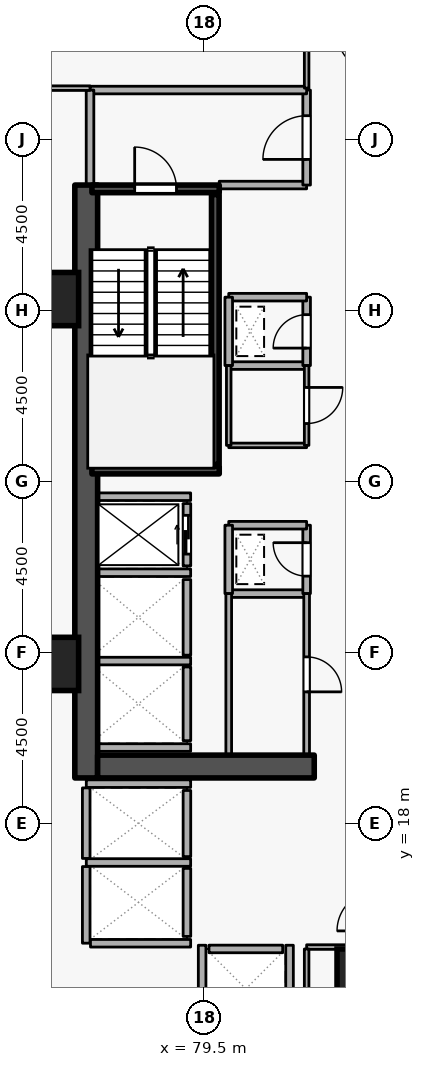
"""IFC4 building model, lengths in metres.
Left out: names, types, materials, properties, quantities, classifications, styles, units other than length and angle.
Written with IfcOpenShell. Run it as: python <this file> out.ifc"""

import sys

from ifc_helpers import new_model, si_unit, direction, frame, frame_2d, origin, origin_2d, place, context, subcontext, project, spatial, rectangle, extrude, element, fill, save


model = new_model("IFC4")
c1 = context("Model", 3, precision=1e-05, world=origin(), true_north=direction((0.0, 1.0)))
c2 = subcontext(c1, "Body", "Model", "MODEL_VIEW")
j1 = project(units=[si_unit("LENGTHUNIT", "METRE"), si_unit("PLANEANGLEUNIT", "RADIAN")], contexts=[c1])
p1 = place(None, origin())
s1 = spatial("IfcSite", under=j1, at=p1, CompositionType="ELEMENT")
p2 = place(p1, origin())
s2 = spatial("IfcBuilding", under=s1, at=p2, CompositionType="ELEMENT")
p3 = place(p2, frame((0.0, 0.0, 45.9)))
s3 = spatial("IfcBuildingStorey", under=s2, at=p3, CompositionType="ELEMENT", Elevation=45.9)
p4 = place(p3, frame((76.4, 19.2, 0.0), z_axis=(0.0, 0.0, 1.0), x_axis=(0.0, 1.0, 0.0)))
e1 = element("IfcWall", 1, at=p4, inside=s3, PredefinedType="SHEAR", context=c2, shape_type="SweptSolid", body=[
    extrude(rectangle(XDim=15.6, YDim=0.6, at=frame_2d((7.8, 0.0))), origin(), (0.0, 0.0, 1.0), 3.6),
])
p5 = place(p3, frame((76.7, 19.5, 0.0), z_axis=(0.0, 0.0, 1.0), x_axis=(1.0, 0.0, 0.0)))
e2 = element("IfcWall", 2, at=p5, inside=s3, PredefinedType="SHEAR", context=c2, shape_type="SweptSolid", body=[
    extrude(rectangle(XDim=5.7, YDim=0.6, at=frame_2d((2.85, 0.0))), origin(), (0.0, 0.0, 1.0), 3.6),
])
for number, where, z_axis, x_axis in (
    (3, (83.7, 14.0, 0.0), (0.0, 0.0, 1.0), (1.0, 0.0, 0.0)),
    (4, (75.5, 22.2, 0.0), (0.0, 0.0, 1.0), (1.0, 0.0, 0.0)),
    (5, (75.5, 31.8, 0.0), (0.0, 0.0, 1.0), (1.0, 0.0, 0.0)),
):
    element("IfcColumn", number, at=place(p3, frame(where, z_axis=z_axis, x_axis=x_axis)), inside=s3, PredefinedType="COLUMN", context=c2, shape_type="SweptSolid", body=[
        extrude(rectangle(XDim=1.4, YDim=1.4, at=origin_2d()), origin(), (0.0, 0.0, 1.0), 3.6),
    ])
p6 = place(p3, frame((79.05, 24.78, 0.0), z_axis=(0.0, 0.0, 1.0), x_axis=(0.0, 1.0, 0.0)))
e6 = element("IfcWall", 6, at=p6, inside=s3, PredefinedType="STANDARD", context=c2, shape_type="SweptSolid", body=[
    extrude(rectangle(XDim=1.64, YDim=0.2, at=frame_2d((0.82, 0.0))), origin(), (0.0, 0.0, 1.0), 3.26),
])
p7 = place(p6, frame((0.31, 0.0, 0.0)))
e7 = element("IfcOpeningElement", 7, at=p7, cuts=e6, PredefinedType="OPENING", context=c2, shape_type="SweptSolid", body=[
    extrude(rectangle(XDim=1.02, YDim=2.06, at=frame_2d((0.51, 1.03))), frame((0.0, 0.11, 0.0), z_axis=(0.0, -1.0, 0.0), x_axis=(1.0, 0.0, 0.0)), (0.0, 0.0, 1.0), 0.22),
])
p8 = place(p3, frame((79.05, 22.43, 0.0), z_axis=(0.0, 0.0, 1.0), x_axis=(0.0, 1.0, 0.0)))
e8 = element("IfcWall", 8, at=p8, inside=s3, PredefinedType="STANDARD", context=c2, shape_type="SweptSolid", body=[
    extrude(rectangle(XDim=1.99, YDim=0.2, at=frame_2d((0.995, 0.0))), origin(), (0.0, 0.0, 1.0), 3.26),
])
p9 = place(p3, frame((79.05, 20.18, 0.0), z_axis=(0.0, 0.0, 1.0), x_axis=(0.0, 1.0, 0.0)))
e9 = element("IfcWall", 9, at=p9, inside=s3, PredefinedType="STANDARD", context=c2, shape_type="SweptSolid", body=[
    extrude(rectangle(XDim=1.94, YDim=0.2, at=frame_2d((0.97, 0.0))), origin(), (0.0, 0.0, 1.0), 3.26),
])
p10 = place(p3, frame((79.05, 17.13, 0.0), z_axis=(0.0, 0.0, 1.0), x_axis=(0.0, 1.0, 0.0)))
e10 = element("IfcWall", 10, at=p10, inside=s3, PredefinedType="STANDARD", context=c2, shape_type="SweptSolid", body=[
    extrude(rectangle(XDim=1.74, YDim=0.2, at=frame_2d((0.87, 0.0))), origin(), (0.0, 0.0, 1.0), 3.26),
])
p11 = place(p3, frame((79.05, 15.03, 0.0), z_axis=(0.0, 0.0, 1.0), x_axis=(0.0, 1.0, 0.0)))
e11 = element("IfcWall", 11, at=p11, inside=s3, PredefinedType="STANDARD", context=c2, shape_type="SweptSolid", body=[
    extrude(rectangle(XDim=1.79, YDim=0.2, at=frame_2d((0.895, 0.0))), origin(), (0.0, 0.0, 1.0), 3.26),
])
p12 = place(p3, frame((79.63, 14.7, 0.0), z_axis=(0.0, 0.0, 1.0), x_axis=(1.0, 0.0, 0.0)))
e12 = element("IfcWall", 12, at=p12, inside=s3, PredefinedType="STANDARD", context=c2, shape_type="SweptSolid", body=[
    extrude(rectangle(XDim=1.94, YDim=0.2, at=frame_2d((0.97, 0.0))), origin(), (0.0, 0.0, 1.0), 3.26),
])
for number, where, z_axis, x_axis in (
    (13, (76.712, 26.6, 0.0), (0.0, 0.0, 1.0), (1.0, 0.0, 0.0)),
    (14, (76.712, 24.6, 0.0), (0.0, 0.0, 1.0), (1.0, 0.0, 0.0)),
    (15, (76.712, 22.275, 0.0), (0.0, 0.0, 1.0), (1.0, 0.0, 0.0)),
    (16, (76.712, 20.0, 0.0), (0.0, 0.0, 1.0), (1.0, 0.0, 0.0)),
):
    element("IfcWall", number, at=place(p3, frame(where, z_axis=z_axis, x_axis=x_axis)), inside=s3, PredefinedType="STANDARD", context=c2, shape_type="SweptSolid", body=[
        extrude(rectangle(XDim=2.436, YDim=0.2, at=frame_2d((1.218, 0.0))), origin(), (0.0, 0.0, 1.0), 3.26),
    ])
p13 = place(p3, frame((76.402, 19.05, 0.0), z_axis=(0.0, 0.0, 1.0), x_axis=(1.0, 0.0, 0.0)))
e17 = element("IfcWall", 17, at=p13, inside=s3, PredefinedType="STANDARD", context=c2, shape_type="SweptSolid", body=[
    extrude(rectangle(XDim=2.746, YDim=0.2, at=frame_2d((1.373, 0.0))), origin(), (0.0, 0.0, 1.0), 2.465),
])
p14 = place(p3, frame((76.402, 16.975, 0.0), z_axis=(0.0, 0.0, 1.0), x_axis=(1.0, 0.0, 0.0)))
e18 = element("IfcWall", 18, at=p14, inside=s3, PredefinedType="STANDARD", context=c2, shape_type="SweptSolid", body=[
    extrude(rectangle(XDim=2.746, YDim=0.2, at=frame_2d((1.373, 0.0))), origin(), (0.0, 0.0, 1.0), 3.26),
])
p15 = place(p3, frame((76.4, 14.852, 0.0), z_axis=(0.0, 0.0, 1.0), x_axis=(0.0, 1.0, 0.0)))
e19 = element("IfcWall", 19, at=p15, inside=s3, PredefinedType="STANDARD", context=c2, shape_type="SweptSolid", body=[
    extrude(rectangle(XDim=2.016, YDim=0.2, at=frame_2d((1.008, 0.0))), origin(), (0.0, 0.0, 1.0), 3.26),
])
p16 = place(p3, frame((76.4, 17.082, 0.0), z_axis=(0.0, 0.0, 1.0), x_axis=(0.0, 1.0, 0.0)))
e20 = element("IfcWall", 20, at=p16, inside=s3, PredefinedType="STANDARD", context=c2, shape_type="SweptSolid", body=[
    extrude(rectangle(XDim=1.856, YDim=0.2, at=frame_2d((0.928, 0.0))), origin(), (0.0, 0.0, 1.0), 3.26),
])
p17 = place(p3, frame((76.512, 14.85, 0.0), z_axis=(0.0, 0.0, 1.0), x_axis=(1.0, 0.0, 0.0)))
e21 = element("IfcWall", 21, at=p17, inside=s3, PredefinedType="STANDARD", context=c2, shape_type="SweptSolid", body=[
    extrude(rectangle(XDim=2.636, YDim=0.2, at=frame_2d((1.318, 0.0))), origin(), (0.0, 0.0, 1.0), 3.26),
])
for number, where, z_axis, x_axis in (
    (22, (81.75, 12.612, 0.0), (0.0, 0.0, 1.0), (0.0, 1.0, 0.0)),
    (23, (79.45, 12.612, 0.0), (0.0, 0.0, 1.0), (0.0, 1.0, 0.0)),
):
    element("IfcWall", number, at=place(p3, frame(where, z_axis=z_axis, x_axis=x_axis)), inside=s3, PredefinedType="STANDARD", context=c2, shape_type="SweptSolid", body=[
        extrude(rectangle(XDim=2.186, YDim=0.2, at=frame_2d((1.093, 0.0))), origin(), (0.0, 0.0, 1.0), 3.26),
    ])
p18 = place(p3, frame((76.55, 34.7, 0.0), z_axis=(0.0, 0.0, 1.0), x_axis=(1.0, 0.0, 0.0)))
e24 = element("IfcWall", 24, at=p18, inside=s3, PredefinedType="SHEAR", context=c2, shape_type="SweptSolid", body=[
    extrude(rectangle(XDim=3.35, YDim=0.2, at=frame_2d((1.675, 0.0))), origin(), (0.0, 0.0, 1.0), 3.6),
])
p19 = place(p18, frame((1.125, 0.0, 0.0)))
e25 = element("IfcOpeningElement", 25, at=p19, cuts=e24, PredefinedType="OPENING", context=c2, shape_type="SweptSolid", body=[
    extrude(rectangle(XDim=1.1, YDim=2.1, at=frame_2d((0.55, 1.05))), frame((0.0, 0.11, 0.0), z_axis=(0.0, -1.0, 0.0), x_axis=(1.0, 0.0, 0.0)), (0.0, 0.0, 1.0), 0.22),
])
p20 = place(p3, frame((79.9, 27.3, 0.0), z_axis=(0.0, 0.0, 1.0), x_axis=(-1.0, 0.0, 0.0)))
e26 = element("IfcWall", 26, at=p20, inside=s3, PredefinedType="SHEAR", context=c2, shape_type="SweptSolid", body=[
    extrude(rectangle(XDim=3.35, YDim=0.2, at=frame_2d((1.675, 0.0))), origin(), (0.0, 0.0, 1.0), 3.6),
])
p21 = place(p3, frame((79.797, 27.45, 0.0), z_axis=(0.0, 0.0, 1.0), x_axis=(0.0, 1.0, 0.0)))
e27 = element("IfcWall", 27, at=p21, inside=s3, PredefinedType="SHEAR", context=c2, shape_type="SweptSolid", body=[
    extrude(rectangle(XDim=7.1, YDim=0.2, at=frame_2d((3.55, 0.0))), origin(), (0.0, 0.0, 1.0), 3.6),
])
p22 = place(p3, frame((79.9, 34.8, 0.0), z_axis=(0.0, 0.0, 1.0), x_axis=(1.0, 0.0, 0.0)))
e28 = element("IfcWall", 28, at=p22, inside=s3, PredefinedType="STANDARD", context=c2, shape_type="SweptSolid", body=[
    extrude(rectangle(XDim=2.3, YDim=0.2, at=frame_2d((1.15, 0.0))), origin(), (0.0, 0.0, 1.0), 2.465),
])
p23 = place(p3, frame((82.2, 34.8, 0.0), z_axis=(0.0, 0.0, 1.0), x_axis=(0.0, 1.0, 0.0)))
e29 = element("IfcWall", 29, at=p23, inside=s3, PredefinedType="STANDARD", context=c2, shape_type="SweptSolid", body=[
    extrude(rectangle(XDim=2.5, YDim=0.2, at=frame_2d((1.25, 0.0))), origin(), (0.0, 0.0, 1.0), 3.26),
])
p24 = place(p23, frame((0.675, 0.0, 0.0)))
e30 = element("IfcOpeningElement", 30, at=p24, cuts=e29, PredefinedType="OPENING", context=c2, shape_type="SweptSolid", body=[
    extrude(rectangle(XDim=1.15, YDim=2.1, at=frame_2d((0.575, 1.05))), frame((0.0, 0.11, 0.0), z_axis=(0.0, -1.0, 0.0), x_axis=(1.0, 0.0, 0.0)), (0.0, 0.0, 1.0), 0.22),
])
p25 = place(p3, frame((82.2, 37.3, 0.0), z_axis=(0.0, 0.0, 1.0), x_axis=(-1.0, 0.0, 0.0)))
e31 = element("IfcWall", 31, at=p25, inside=s3, PredefinedType="STANDARD", context=c2, shape_type="SweptSolid", body=[
    extrude(rectangle(XDim=5.7, YDim=0.2, at=frame_2d((2.85, 0.0))), origin(), (0.0, 0.0, 1.0), 3.26),
])
p26 = place(p3, frame((76.5, 37.3, 0.0), z_axis=(0.0, 0.0, 1.0), x_axis=(0.0, -1.0, 0.0)))
e32 = element("IfcWall", 32, at=p26, inside=s3, PredefinedType="STANDARD", context=c2, shape_type="SweptSolid", body=[
    extrude(rectangle(XDim=2.5, YDim=0.2, at=frame_2d((1.25, 0.0))), origin(), (0.0, 0.0, 1.0), 3.26),
])
p27 = place(p3, frame((80.15, 24.05, 0.0), z_axis=(0.0, 0.0, 1.0), x_axis=(1.0, 0.0, 0.0)))
e33 = element("IfcWall", 33, at=p27, inside=s3, PredefinedType="STANDARD", context=c2, shape_type="SweptSolid", body=[
    extrude(rectangle(XDim=2.05, YDim=0.2, at=frame_2d((1.025, 0.0))), origin(), (0.0, 0.0, 1.0), 3.26),
])
p28 = place(p3, frame((82.2, 24.05, 0.0), z_axis=(0.0, 0.0, 1.0), x_axis=(0.0, 1.0, 0.0)))
e34 = element("IfcWall", 34, at=p28, inside=s3, PredefinedType="STANDARD", context=c2, shape_type="SweptSolid", body=[
    extrude(rectangle(XDim=1.8, YDim=0.2, at=frame_2d((0.9, 0.0))), origin(), (0.0, 0.0, 1.0), 3.26),
])
p29 = place(p28, frame((0.46, 0.0, 0.0)))
e35 = element("IfcOpeningElement", 35, at=p29, cuts=e34, PredefinedType="OPENING", context=c2, shape_type="SweptSolid", body=[
    extrude(rectangle(XDim=0.88, YDim=2.04, at=frame_2d((0.44, 1.02))), frame((0.0, 0.11, 0.0), z_axis=(0.0, -1.0, 0.0), x_axis=(1.0, 0.0, 0.0)), (0.0, 0.0, 1.0), 0.22),
])
p30 = place(p3, frame((82.2, 25.85, 0.0), z_axis=(0.0, 0.0, 1.0), x_axis=(-1.0, 0.0, 0.0)))
e36 = element("IfcWall", 36, at=p30, inside=s3, PredefinedType="STANDARD", context=c2, shape_type="SweptSolid", body=[
    extrude(rectangle(XDim=2.05, YDim=0.2, at=frame_2d((1.025, 0.0))), origin(), (0.0, 0.0, 1.0), 3.26),
])
p31 = place(p3, frame((80.15, 25.85, 0.0), z_axis=(0.0, 0.0, 1.0), x_axis=(0.0, -1.0, 0.0)))
e37 = element("IfcWall", 37, at=p31, inside=s3, PredefinedType="STANDARD", context=c2, shape_type="SweptSolid", body=[
    extrude(rectangle(XDim=1.8, YDim=0.2, at=frame_2d((0.9, 0.0))), origin(), (0.0, 0.0, 1.0), 3.26),
])
p32 = place(p3, frame((80.15, 30.05, 0.0), z_axis=(0.0, 0.0, 1.0), x_axis=(1.0, 0.0, 0.0)))
e38 = element("IfcWall", 38, at=p32, inside=s3, PredefinedType="STANDARD", context=c2, shape_type="SweptSolid", body=[
    extrude(rectangle(XDim=2.05, YDim=0.2, at=frame_2d((1.025, 0.0))), origin(), (0.0, 0.0, 1.0), 3.26),
])
p33 = place(p3, frame((82.2, 30.05, 0.0), z_axis=(0.0, 0.0, 1.0), x_axis=(0.0, 1.0, 0.0)))
e39 = element("IfcWall", 39, at=p33, inside=s3, PredefinedType="STANDARD", context=c2, shape_type="SweptSolid", body=[
    extrude(rectangle(XDim=1.8, YDim=0.2, at=frame_2d((0.9, 0.0))), origin(), (0.0, 0.0, 1.0), 3.26),
])
p34 = place(p33, frame((0.46, 0.0, 0.0)))
e40 = element("IfcOpeningElement", 40, at=p34, cuts=e39, PredefinedType="OPENING", context=c2, shape_type="SweptSolid", body=[
    extrude(rectangle(XDim=0.88, YDim=2.04, at=frame_2d((0.44, 1.02))), frame((0.0, 0.11, 0.0), z_axis=(0.0, -1.0, 0.0), x_axis=(1.0, 0.0, 0.0)), (0.0, 0.0, 1.0), 0.22),
])
p35 = place(p3, frame((82.2, 31.85, 0.0), z_axis=(0.0, 0.0, 1.0), x_axis=(-1.0, 0.0, 0.0)))
e41 = element("IfcWall", 41, at=p35, inside=s3, PredefinedType="STANDARD", context=c2, shape_type="SweptSolid", body=[
    extrude(rectangle(XDim=2.05, YDim=0.2, at=frame_2d((1.025, 0.0))), origin(), (0.0, 0.0, 1.0), 3.26),
])
p36 = place(p3, frame((80.15, 31.85, 0.0), z_axis=(0.0, 0.0, 1.0), x_axis=(0.0, -1.0, 0.0)))
e42 = element("IfcWall", 42, at=p36, inside=s3, PredefinedType="STANDARD", context=c2, shape_type="SweptSolid", body=[
    extrude(rectangle(XDim=1.8, YDim=0.2, at=frame_2d((0.9, 0.0))), origin(), (0.0, 0.0, 1.0), 3.26),
])
p37 = place(p3, frame((80.15, 19.8, 0.0), z_axis=(0.0, 0.0, 1.0), x_axis=(0.0, 1.0, 0.0)))
e43 = element("IfcWall", 43, at=p37, inside=s3, PredefinedType="PARTITIONING", context=c2, shape_type="SweptSolid", body=[
    extrude(rectangle(XDim=4.25, YDim=0.15, at=frame_2d((2.125, 0.0))), origin(), (0.0, 0.0, 1.0), 3.26),
])
p38 = place(p3, frame((82.2, 24.05, 0.0), z_axis=(0.0, 0.0, 1.0), x_axis=(0.0, -1.0, 0.0)))
e44 = element("IfcWall", 44, at=p38, inside=s3, PredefinedType="PARTITIONING", context=c2, shape_type="SweptSolid", body=[
    extrude(rectangle(XDim=4.25, YDim=0.15, at=frame_2d((2.125, 0.0))), origin(), (0.0, 0.0, 1.0), 3.26),
])
p39 = place(p38, frame((1.665, 0.0, 0.0)))
e45 = element("IfcOpeningElement", 45, at=p39, cuts=e44, PredefinedType="OPENING", context=c2, shape_type="SweptSolid", body=[
    extrude(rectangle(XDim=0.92, YDim=2.08, at=frame_2d((0.46, 1.04))), frame((0.0, 0.085, 0.0), z_axis=(0.0, -1.0, 0.0), x_axis=(1.0, 0.0, 0.0)), (0.0, 0.0, 1.0), 0.17),
])
p40 = place(p3, frame((82.2, 27.95, 0.0), z_axis=(0.0, 0.0, 1.0), x_axis=(-1.0, 0.0, 0.0)))
e46 = element("IfcWall", 46, at=p40, inside=s3, PredefinedType="PARTITIONING", context=c2, shape_type="SweptSolid", body=[
    extrude(rectangle(XDim=2.05, YDim=0.12, at=frame_2d((1.025, 0.0))), origin(), (0.0, 0.0, 1.0), 3.26),
])
p41 = place(p3, frame((80.15, 27.95, 0.0), z_axis=(0.0, 0.0, 1.0), x_axis=(0.0, 1.0, 0.0)))
e47 = element("IfcWall", 47, at=p41, inside=s3, PredefinedType="PARTITIONING", context=c2, shape_type="SweptSolid", body=[
    extrude(rectangle(XDim=2.1, YDim=0.12, at=frame_2d((1.05, 0.0))), origin(), (0.0, 0.0, 1.0), 3.26),
])
p42 = place(p3, frame((82.2, 30.05, 0.0), z_axis=(0.0, 0.0, 1.0), x_axis=(0.0, -1.0, 0.0)))
e48 = element("IfcWall", 48, at=p42, inside=s3, PredefinedType="PARTITIONING", context=c2, shape_type="SweptSolid", body=[
    extrude(rectangle(XDim=2.1, YDim=0.12, at=frame_2d((1.05, 0.0))), origin(), (0.0, 0.0, 1.0), 3.26),
])
p43 = place(p42, frame((0.575, 0.0, 0.0)))
e49 = element("IfcOpeningElement", 49, at=p43, cuts=e48, PredefinedType="OPENING", context=c2, shape_type="SweptSolid", body=[
    extrude(rectangle(XDim=0.95, YDim=2.1, at=frame_2d((0.475, 1.05))), frame((0.0, 0.07, 0.0), z_axis=(0.0, -1.0, 0.0), x_axis=(1.0, 0.0, 0.0)), (0.0, 0.0, 1.0), 0.14),
])
p44 = place(p3, frame((82.2, 14.75, 0.0), z_axis=(0.0, 0.0, 1.0), x_axis=(1.0, 0.0, 0.0)))
e50 = element("IfcWall", 50, at=p44, inside=s3, PredefinedType="PARTITIONING", context=c2, shape_type="SweptSolid", body=[
    extrude(rectangle(XDim=1.85, YDim=0.12, at=frame_2d((0.925, 0.0))), origin(), (0.0, 0.0, 1.0), 3.26),
])
p45 = place(p3, frame((82.2, 12.4, 0.0), z_axis=(0.0, 0.0, 1.0), x_axis=(0.0, 1.0, 0.0)))
e51 = element("IfcWall", 51, at=p45, inside=s3, PredefinedType="PARTITIONING", context=c2, shape_type="SweptSolid", body=[
    extrude(rectangle(XDim=2.3, YDim=0.12, at=frame_2d((1.15, 0.0))), origin(), (0.0, 0.0, 1.0), 3.26),
])
p46 = place(p3, frame((82.2, 39.25, 0.0), z_axis=(0.0, 0.0, 1.0), x_axis=(0.0, -1.0, 0.0)))
e52 = element("IfcWall", 52, at=p46, inside=s3, PredefinedType="PARTITIONING", context=c2, shape_type="SweptSolid", body=[
    extrude(rectangle(XDim=1.9, YDim=0.12, at=frame_2d((0.95, 0.0))), origin(), (0.0, 0.0, 1.0), 3.26),
])
p47 = place(p3, frame((76.5, 37.35, 0.0), z_axis=(0.0, 0.0, 1.0), x_axis=(-1.0, 0.0, 0.0)))
e53 = element("IfcWall", 53, at=p47, inside=s3, PredefinedType="PARTITIONING", context=c2, shape_type="SweptSolid", body=[
    extrude(rectangle(XDim=6.22, YDim=0.12, at=frame_2d((3.11, 0.0))), origin(), (0.0, 0.0, 1.0), 3.26),
])
p48 = place(p7, origin())
e54 = element("IfcDoor", 54, at=p48, inside=s3, OperationType="SLIDING_TO_LEFT", PredefinedType="DOOR", context=c2, shape_type="SweptSolid", body=[
    extrude(rectangle(XDim=1.02, YDim=2.06, at=frame_2d((0.51, 1.03))), frame((0.0, 0.025, 0.0), z_axis=(0.0, -1.0, 0.0), x_axis=(1.0, 0.0, 0.0)), (0.0, 0.0, 1.0), 0.05),
])
fill(e7, e54)
p49 = place(p19, origin())
e55 = element("IfcDoor", 55, at=p49, inside=s3, OperationType="SINGLE_SWING_LEFT", PredefinedType="DOOR", context=c2, shape_type="SweptSolid", body=[
    extrude(rectangle(XDim=1.1, YDim=2.1, at=frame_2d((0.55, 1.05))), frame((0.0, 0.025, 0.0), z_axis=(0.0, -1.0, 0.0), x_axis=(1.0, 0.0, 0.0)), (0.0, 0.0, 1.0), 0.05),
])
fill(e25, e55)
p50 = place(p24, origin())
e56 = element("IfcDoor", 56, at=p50, inside=s3, OperationType="SINGLE_SWING_LEFT", PredefinedType="DOOR", context=c2, shape_type="SweptSolid", body=[
    extrude(rectangle(XDim=1.15, YDim=2.1, at=frame_2d((0.575, 1.05))), frame((0.0, 0.025, 0.0), z_axis=(0.0, -1.0, 0.0), x_axis=(1.0, 0.0, 0.0)), (0.0, 0.0, 1.0), 0.05),
])
fill(e30, e56)
p51 = place(p29, origin())
e57 = element("IfcDoor", 57, at=p51, inside=s3, OperationType="SINGLE_SWING_RIGHT", PredefinedType="DOOR", context=c2, shape_type="SweptSolid", body=[
    extrude(rectangle(XDim=0.88, YDim=2.04, at=frame_2d((0.44, 1.02))), frame((0.0, 0.025, 0.0), z_axis=(0.0, -1.0, 0.0), x_axis=(1.0, 0.0, 0.0)), (0.0, 0.0, 1.0), 0.05),
])
fill(e35, e57)
p52 = place(p34, origin())
e58 = element("IfcDoor", 58, at=p52, inside=s3, OperationType="SINGLE_SWING_LEFT", PredefinedType="DOOR", context=c2, shape_type="SweptSolid", body=[
    extrude(rectangle(XDim=0.88, YDim=2.04, at=frame_2d((0.44, 1.02))), frame((0.0, 0.025, 0.0), z_axis=(0.0, -1.0, 0.0), x_axis=(1.0, 0.0, 0.0)), (0.0, 0.0, 1.0), 0.05),
])
fill(e40, e58)
p53 = place(p39, origin())
e59 = element("IfcDoor", 59, at=p53, inside=s3, OperationType="SINGLE_SWING_RIGHT", PredefinedType="DOOR", context=c2, shape_type="SweptSolid", body=[
    extrude(rectangle(XDim=0.92, YDim=2.08, at=frame_2d((0.46, 1.04))), frame((0.0, 0.025, 0.0), z_axis=(0.0, -1.0, 0.0), x_axis=(1.0, 0.0, 0.0)), (0.0, 0.0, 1.0), 0.05),
])
fill(e45, e59)
p54 = place(p43, origin())
e60 = element("IfcDoor", 60, at=p54, inside=s3, OperationType="SINGLE_SWING_LEFT", PredefinedType="DOOR", context=c2, shape_type="SweptSolid", body=[
    extrude(rectangle(XDim=0.95, YDim=2.1, at=frame_2d((0.475, 1.05))), frame((0.0, 0.025, 0.0), z_axis=(0.0, -1.0, 0.0), x_axis=(1.0, 0.0, 0.0)), (0.0, 0.0, 1.0), 0.05),
])
fill(e49, e60)
save(model, sys.argv[1])
